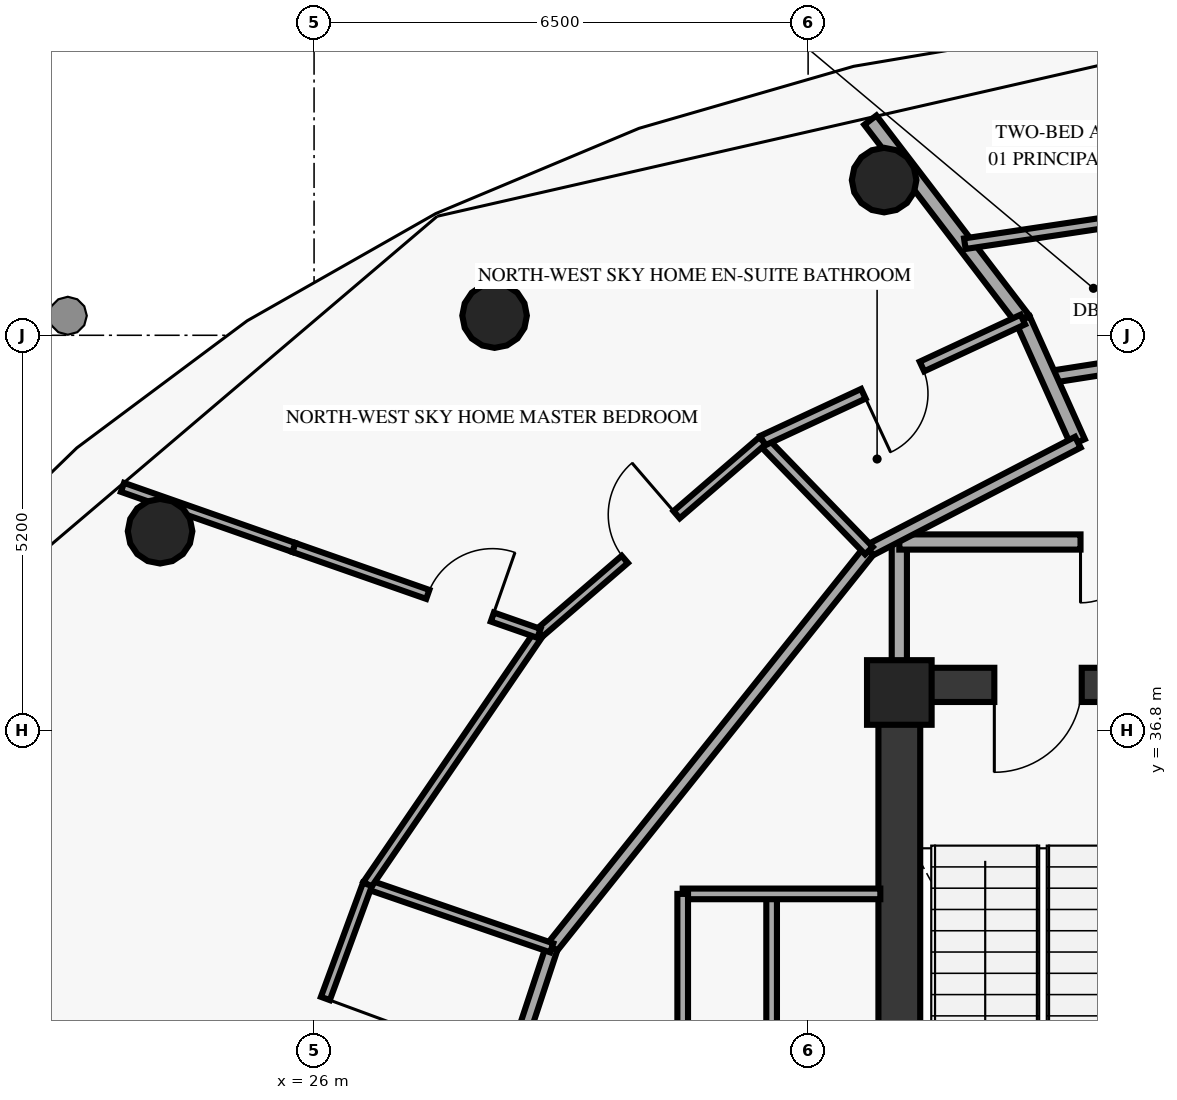
"""IFC4 building model, lengths in metres.
Left out: names, types, materials, properties, quantities, classifications, styles, units other than length and angle.
Written with IfcOpenShell. Run it as: python <this file> out.ifc"""

import sys

from ifc_helpers import new_model, si_unit, direction, frame, frame_2d, origin, origin_2d, place, context, subcontext, project, spatial, rectangle, circle, extrude, element, fill, save


model = new_model("IFC4")
c1 = context("Model", 3, precision=1e-05, world=origin(), true_north=direction((0.0, 1.0)))
c2 = subcontext(c1, "Body", "Model", "MODEL_VIEW")
j1 = project(units=[si_unit("LENGTHUNIT", "METRE"), si_unit("PLANEANGLEUNIT", "RADIAN")], contexts=[c1])
p1 = place(None, origin())
s1 = spatial("IfcSite", under=j1, at=p1, CompositionType="ELEMENT")
p2 = place(p1, origin())
s2 = spatial("IfcBuilding", under=s1, at=p2, CompositionType="ELEMENT")
p3 = place(p2, frame((0.0, 0.0, 208.15)))
s3 = spatial("IfcBuildingStorey", under=s2, at=p3, CompositionType="ELEMENT", Elevation=208.15)
p4 = place(p3, frame((33.7, 37.3, 0.0), z_axis=(0.0, 0.0, 1.0), x_axis=(1.0, 0.0, 0.0)))
e1 = element("IfcColumn", 1, at=p4, inside=s3, PredefinedType="PILASTER", context=c2, shape_type="SweptSolid", body=[
    extrude(rectangle(XDim=0.85, YDim=0.85, at=origin_2d()), origin(), (0.0, 0.0, 1.0), 3.41),
])
for number, where, z_axis, x_axis in (
    (2, (33.5, 44.042, 0.0), (0.0, 0.0, 1.0), (1.0, 0.0, 0.0)),
    (3, (28.375, 42.259, 0.0), (0.0, 0.0, 1.0), (1.0, 0.0, 0.0)),
    (4, (23.974, 39.422, 0.0), (0.0, 0.0, 1.0), (1.0, 0.0, 0.0)),
):
    element("IfcColumn", number, at=place(p3, frame(where, z_axis=z_axis, x_axis=x_axis)), inside=s3, PredefinedType="COLUMN", context=c2, shape_type="SweptSolid", body=[
        extrude(circle(Radius=0.425, at=origin_2d()), origin(), (0.0, 0.0, 1.0), 3.41),
    ])
p5 = place(p3, frame((33.7, 29.05, 0.0), z_axis=(0.0, 0.0, 1.0), x_axis=(0.0, 1.0, 0.0)))
e5 = element("IfcWall", 5, at=p5, inside=s3, PredefinedType="SHEAR", context=c2, shape_type="SweptSolid", body=[
    extrude(rectangle(XDim=8.35, YDim=0.55, at=frame_2d((4.175, 0.0))), origin(), (0.0, 0.0, 1.0), 3.41),
])
p6 = place(p3, frame((37.35, 37.4, 0.0), z_axis=(0.0, 0.0, 1.0), x_axis=(-1.0, 0.0, 0.0)))
e6 = element("IfcWall", 6, at=p6, inside=s3, PredefinedType="SHEAR", context=c2, shape_type="SweptSolid", body=[
    extrude(rectangle(XDim=3.65, YDim=0.45, at=frame_2d((1.825, 0.0))), origin(), (0.0, 0.0, 1.0), 3.41),
])
p7 = place(p6, frame((1.25, 0.0, 0.0)))
e7 = element("IfcOpeningElement", 7, at=p7, cuts=e6, PredefinedType="OPENING", context=c2, shape_type="SweptSolid", body=[
    extrude(rectangle(XDim=1.15, YDim=2.15, at=frame_2d((0.575, 1.075))), frame((0.0, 0.235, 0.0), z_axis=(0.0, -1.0, 0.0), x_axis=(1.0, 0.0, 0.0)), (0.0, 0.0, 1.0), 0.47),
])
p8 = place(p3, frame((33.7, 37.4, 0.0), z_axis=(0.0, 0.0, 1.0), x_axis=(0.0, 1.0, 0.0)))
e8 = element("IfcWall", 8, at=p8, inside=s3, PredefinedType="SOLIDWALL", context=c2, shape_type="SweptSolid", body=[
    extrude(rectangle(XDim=1.88, YDim=0.2, at=frame_2d((0.94, 0.0))), origin(), (0.0, 0.0, 1.0), 3.41),
])
p9 = place(p3, frame((38.9, 39.28, 0.0), z_axis=(0.0, 0.0, 1.0), x_axis=(-1.0, 0.0, 0.0)))
e9 = element("IfcWall", 9, at=p9, inside=s3, PredefinedType="SOLIDWALL", context=c2, shape_type="SweptSolid", body=[
    extrude(rectangle(XDim=5.2, YDim=0.2, at=frame_2d((2.6, 0.0))), origin(), (0.0, 0.0, 1.0), 3.41),
])
p10 = place(p9, frame((1.216, 0.0, 0.0)))
e10 = element("IfcOpeningElement", 10, at=p10, cuts=e9, PredefinedType="OPENING", context=c2, shape_type="SweptSolid", body=[
    extrude(rectangle(XDim=1.6, YDim=2.2, at=frame_2d((0.8, 1.1))), frame((0.0, 0.11, 0.0), z_axis=(0.0, -1.0, 0.0), x_axis=(1.0, 0.0, 0.0)), (0.0, 0.0, 1.0), 0.22),
])
p11 = place(p3, frame((32.02, 29.05, 0.0), z_axis=(0.0, 0.0, 1.0), x_axis=(0.0, 1.0, 0.0)))
e11 = element("IfcWall", 11, at=p11, inside=s3, PredefinedType="PARTITIONING", context=c2, shape_type="SweptSolid", body=[
    extrude(rectangle(XDim=5.6, YDim=0.14, at=frame_2d((2.8, 0.0))), origin(), (0.0, 0.0, 1.0), 3.41),
])
p12 = place(p3, frame((30.85, 34.65, 0.0), z_axis=(0.0, 0.0, 1.0), x_axis=(1.0, 0.0, 0.0)))
e12 = element("IfcWall", 12, at=p12, inside=s3, PredefinedType="PARTITIONING", context=c2, shape_type="SweptSolid", body=[
    extrude(rectangle(XDim=2.6, YDim=0.14, at=frame_2d((1.3, 0.0))), origin(), (0.0, 0.0, 1.0), 3.41),
])
p13 = place(p3, frame((30.85, 29.05, 0.0), z_axis=(0.0, 0.0, 1.0), x_axis=(0.0, 1.0, 0.0)))
e13 = element("IfcWall", 13, at=p13, inside=s3, PredefinedType="PARTITIONING", context=c2, shape_type="SweptSolid", body=[
    extrude(rectangle(XDim=5.6, YDim=0.14, at=frame_2d((2.8, 0.0))), origin(), (0.0, 0.0, 1.0), 3.41),
])
p14 = place(p3, frame((39.0, 41.97, 0.0), z_axis=(0.0, 0.0, 1.0), x_axis=(-0.987972011059, -0.154632808173, 0.0)))
e14 = element("IfcWall", 14, at=p14, inside=s3, PredefinedType="PARTITIONING", context=c2, shape_type="SweptSolid", body=[
    extrude(rectangle(XDim=3.375, YDim=0.16, at=frame_2d((1.688, 0.0))), origin(), (0.0, 0.0, 1.0), 3.41),
])
p15 = place(p3, frame((36.049, 40.593, 0.0), z_axis=(0.0, 0.0, 1.0), x_axis=(-0.409337233456, 0.912383159263, 0.0)))
e15 = element("IfcWall", 15, at=p15, inside=s3, PredefinedType="PARTITIONING", context=c2, shape_type="SweptSolid", body=[
    extrude(rectangle(XDim=1.769, YDim=0.2, at=frame_2d((0.885, 0.0))), origin(), (0.0, 0.0, 1.0), 3.41),
])
p16 = place(p3, frame((35.325, 42.207, 0.0), z_axis=(0.0, 0.0, 1.0), x_axis=(-0.607307427022, 0.794466921328, 0.0)))
e16 = element("IfcWall", 16, at=p16, inside=s3, PredefinedType="PARTITIONING", context=c2, shape_type="SweptSolid", body=[
    extrude(rectangle(XDim=3.303, YDim=0.2, at=frame_2d((1.651, 0.0))), origin(), (0.0, 0.0, 1.0), 3.41),
])
p17 = place(p3, frame((34.562, 43.205, 0.0), z_axis=(0.0, 0.0, 1.0), x_axis=(0.98895789125, 0.148196792593, 0.0)))
e17 = element("IfcWall", 17, at=p17, inside=s3, PredefinedType="PARTITIONING", context=c2, shape_type="SweptSolid", body=[
    extrude(rectangle(XDim=4.488, YDim=0.14, at=frame_2d((2.244, 0.0))), origin(), (0.0, 0.0, 1.0), 3.41),
])
p18 = place(p17, frame((2.1, 0.0, 0.0)))
e18 = element("IfcOpeningElement", 18, at=p18, cuts=e17, PredefinedType="OPENING", context=c2, shape_type="SweptSolid", body=[
    extrude(rectangle(XDim=0.85, YDim=2.1, at=frame_2d((0.425, 1.05))), frame((0.0, 0.08, 0.0), z_axis=(0.0, -1.0, 0.0), x_axis=(1.0, 0.0, 0.0)), (0.0, 0.0, 1.0), 0.16),
])
p19 = place(p3, frame((36.049, 40.593, 0.0), z_axis=(0.0, 0.0, 1.0), x_axis=(-0.887674575788, -0.460471331898, 0.0)))
e19 = element("IfcWall", 19, at=p19, inside=s3, PredefinedType="PARTITIONING", context=c2, shape_type="SweptSolid", body=[
    extrude(rectangle(XDim=3.097, YDim=0.16, at=frame_2d((1.548, 0.0))), origin(), (0.0, 0.0, 1.0), 3.41),
])
p20 = place(p3, frame((33.3, 39.167, 0.0), z_axis=(0.0, 0.0, 1.0), x_axis=(-0.623915746766, -0.781491612839, 0.0)))
e20 = element("IfcWall", 20, at=p20, inside=s3, PredefinedType="PARTITIONING", context=c2, shape_type="SweptSolid", body=[
    extrude(rectangle(XDim=6.688, YDim=0.16, at=frame_2d((3.344, 0.0))), origin(), (0.0, 0.0, 1.0), 3.41),
])
p21 = place(p3, frame((29.127, 33.94, 0.0), z_axis=(0.0, 0.0, 1.0), x_axis=(-0.313985571683, -0.949427754374, 0.0)))
e21 = element("IfcWall", 21, at=p21, inside=s3, PredefinedType="PARTITIONING", context=c2, shape_type="SweptSolid", body=[
    extrude(rectangle(XDim=3.627, YDim=0.16, at=frame_2d((1.813, 0.0))), origin(), (0.0, 0.0, 1.0), 3.41),
])
p22 = place(p3, frame((33.3, 39.167, 0.0), z_axis=(0.0, 0.0, 1.0), x_axis=(-0.695613346208, 0.718416364358, 0.0)))
e22 = element("IfcWall", 22, at=p22, inside=s3, PredefinedType="PARTITIONING", context=c2, shape_type="SweptSolid", body=[
    extrude(rectangle(XDim=2.013, YDim=0.14, at=frame_2d((1.006, 0.0))), origin(), (0.0, 0.0, 1.0), 3.41),
])
p23 = place(p3, frame((29.127, 33.94, 0.0), z_axis=(0.0, 0.0, 1.0), x_axis=(-0.945524617104, 0.325550608124, 0.0)))
e23 = element("IfcWall", 23, at=p23, inside=s3, PredefinedType="PARTITIONING", context=c2, shape_type="SweptSolid", body=[
    extrude(rectangle(XDim=2.565, YDim=0.125, at=frame_2d((1.282, 0.0))), origin(), (0.0, 0.0, 1.0), 3.41),
])
p24 = place(p3, frame((31.9, 40.613, 0.0), z_axis=(0.0, 0.0, 1.0), x_axis=(0.906625113427, 0.421937085007, 0.0)))
e24 = element("IfcWall", 24, at=p24, inside=s3, PredefinedType="PARTITIONING", context=c2, shape_type="SweptSolid", body=[
    extrude(rectangle(XDim=3.778, YDim=0.14, at=frame_2d((1.889, 0.0))), origin(), (0.0, 0.0, 1.0), 3.41),
])
p25 = place(p24, frame((1.464, 0.0, 0.0)))
e25 = element("IfcOpeningElement", 25, at=p25, cuts=e24, PredefinedType="OPENING", context=c2, shape_type="SweptSolid", body=[
    extrude(rectangle(XDim=0.85, YDim=2.1, at=frame_2d((0.425, 1.05))), frame((0.0, 0.08, 0.0), z_axis=(0.0, -1.0, 0.0), x_axis=(1.0, 0.0, 0.0)), (0.0, 0.0, 1.0), 0.16),
])
p26 = place(p3, frame((28.959, 38.078, 0.0), z_axis=(0.0, 0.0, 1.0), x_axis=(0.757424973134, 0.652922208286, 0.0)))
e26 = element("IfcWall", 26, at=p26, inside=s3, PredefinedType="PARTITIONING", context=c2, shape_type="SweptSolid", body=[
    extrude(rectangle(XDim=3.883, YDim=0.125, at=frame_2d((1.941, 0.0))), origin(), (0.0, 0.0, 1.0), 3.41),
])
p27 = place(p26, frame((1.491, 0.0, 0.0)))
e27 = element("IfcOpeningElement", 27, at=p27, cuts=e26, PredefinedType="OPENING", context=c2, shape_type="SweptSolid", body=[
    extrude(rectangle(XDim=0.9, YDim=2.1, at=frame_2d((0.45, 1.05))), frame((0.0, 0.073, 0.0), z_axis=(0.0, -1.0, 0.0), x_axis=(1.0, 0.0, 0.0)), (0.0, 0.0, 1.0), 0.145),
])
p28 = place(p3, frame((28.959, 38.078, 0.0), z_axis=(0.0, 0.0, 1.0), x_axis=(-0.56419813198, -0.825639429697, 0.0)))
e28 = element("IfcWall", 28, at=p28, inside=s3, PredefinedType="PARTITIONING", context=c2, shape_type="SweptSolid", body=[
    extrude(rectangle(XDim=4.0, YDim=0.125, at=frame_2d((2.0, 0.0))), origin(), (0.0, 0.0, 1.0), 3.41),
])
p29 = place(p3, frame((25.284, 30.928, 0.0), z_axis=(0.0, 0.0, 1.0), x_axis=(0.345851608983, 0.938289222236, 0.0)))
e29 = element("IfcWall", 29, at=p29, inside=s3, PredefinedType="PARTITIONING", context=c2, shape_type="SweptSolid", body=[
    extrude(rectangle(XDim=4.1, YDim=0.125, at=frame_2d((2.05, 0.0))), origin(), (0.0, 0.0, 1.0), 3.41),
])
p30 = place(p29, frame((1.6, 0.0, 0.0)))
e30 = element("IfcOpeningElement", 30, at=p30, cuts=e29, PredefinedType="OPENING", context=c2, shape_type="SweptSolid", body=[
    extrude(rectangle(XDim=0.9, YDim=2.1, at=frame_2d((0.45, 1.05))), frame((0.0, 0.073, 0.0), z_axis=(0.0, -1.0, 0.0), x_axis=(1.0, 0.0, 0.0)), (0.0, 0.0, 1.0), 0.145),
])
p31 = place(p3, frame((28.959, 38.078, 0.0), z_axis=(0.0, 0.0, 1.0), x_axis=(-0.943735775688, 0.33070044706, 0.0)))
e31 = element("IfcWall", 31, at=p31, inside=s3, PredefinedType="PARTITIONING", context=c2, shape_type="SweptSolid", body=[
    extrude(rectangle(XDim=3.417, YDim=0.125, at=frame_2d((1.709, 0.0))), origin(), (0.0, 0.0, 1.0), 2.88),
])
p32 = place(p31, frame((0.65, 0.0, 0.0)))
e32 = element("IfcOpeningElement", 32, at=p32, cuts=e31, PredefinedType="OPENING", context=c2, shape_type="SweptSolid", body=[
    extrude(rectangle(XDim=0.9, YDim=2.1, at=frame_2d((0.45, 1.05))), frame((0.0, 0.073, 0.0), z_axis=(0.0, -1.0, 0.0), x_axis=(1.0, 0.0, 0.0)), (0.0, 0.0, 1.0), 0.145),
])
p33 = place(p3, frame((25.734, 39.208, 0.0), z_axis=(0.0, 0.0, 1.0), x_axis=(-0.943622379066, 0.331023874857, 0.0)))
e33 = element("IfcWall", 33, at=p33, inside=s3, PredefinedType="PARTITIONING", context=c2, shape_type="SweptSolid", body=[
    extrude(rectangle(XDim=2.39, YDim=0.125, at=frame_2d((1.195, 0.0))), origin(), (0.0, 0.0, 1.0), 3.41),
])
p34 = place(p7, origin())
e34 = element("IfcDoor", 34, at=p34, inside=s3, OperationType="SINGLE_SWING_RIGHT", PredefinedType="DOOR", context=c2, shape_type="SweptSolid", body=[
    extrude(rectangle(XDim=1.15, YDim=2.15, at=frame_2d((0.575, 1.075))), frame((0.0, 0.025, 0.0), z_axis=(0.0, -1.0, 0.0), x_axis=(1.0, 0.0, 0.0)), (0.0, 0.0, 1.0), 0.05),
])
fill(e7, e34)
p35 = place(p10, origin())
e35 = element("IfcDoor", 35, at=p35, inside=s3, OperationType="DOUBLE_DOOR_SINGLE_SWING", PredefinedType="DOOR", context=c2, shape_type="SweptSolid", body=[
    extrude(rectangle(XDim=1.6, YDim=2.2, at=frame_2d((0.8, 1.1))), frame((0.0, 0.025, 0.0), z_axis=(0.0, -1.0, 0.0), x_axis=(1.0, 0.0, 0.0)), (0.0, 0.0, 1.0), 0.05),
])
fill(e10, e35)
p36 = place(p25, origin())
e36 = element("IfcDoor", 36, at=p36, inside=s3, OperationType="SINGLE_SWING_LEFT", PredefinedType="DOOR", context=c2, shape_type="SweptSolid", body=[
    extrude(rectangle(XDim=0.85, YDim=2.1, at=frame_2d((0.425, 1.05))), frame((0.0, 0.025, 0.0), z_axis=(0.0, -1.0, 0.0), x_axis=(1.0, 0.0, 0.0)), (0.0, 0.0, 1.0), 0.05),
])
fill(e25, e36)
p37 = place(p27, origin())
e37 = element("IfcDoor", 37, at=p37, inside=s3, OperationType="SINGLE_SWING_RIGHT", PredefinedType="DOOR", context=c2, shape_type="SweptSolid", body=[
    extrude(rectangle(XDim=0.9, YDim=2.1, at=frame_2d((0.45, 1.05))), frame((0.0, 0.025, 0.0), z_axis=(0.0, -1.0, 0.0), x_axis=(1.0, 0.0, 0.0)), (0.0, 0.0, 1.0), 0.05),
])
fill(e27, e37)
p38 = place(p30, origin())
e38 = element("IfcDoor", 38, at=p38, inside=s3, OperationType="SINGLE_SWING_RIGHT", PredefinedType="DOOR", context=c2, shape_type="SweptSolid", body=[
    extrude(rectangle(XDim=0.9, YDim=2.1, at=frame_2d((0.45, 1.05))), frame((0.0, 0.025, 0.0), z_axis=(0.0, -1.0, 0.0), x_axis=(1.0, 0.0, 0.0)), (0.0, 0.0, 1.0), 0.05),
])
fill(e30, e38)
p39 = place(p32, origin())
e39 = element("IfcDoor", 39, at=p39, inside=s3, OperationType="SINGLE_SWING_LEFT", PredefinedType="DOOR", context=c2, shape_type="SweptSolid", body=[
    extrude(rectangle(XDim=0.9, YDim=2.1, at=frame_2d((0.45, 1.05))), frame((0.0, 0.025, 0.0), z_axis=(0.0, -1.0, 0.0), x_axis=(1.0, 0.0, 0.0)), (0.0, 0.0, 1.0), 0.05),
])
fill(e32, e39)
save(model, sys.argv[1])
